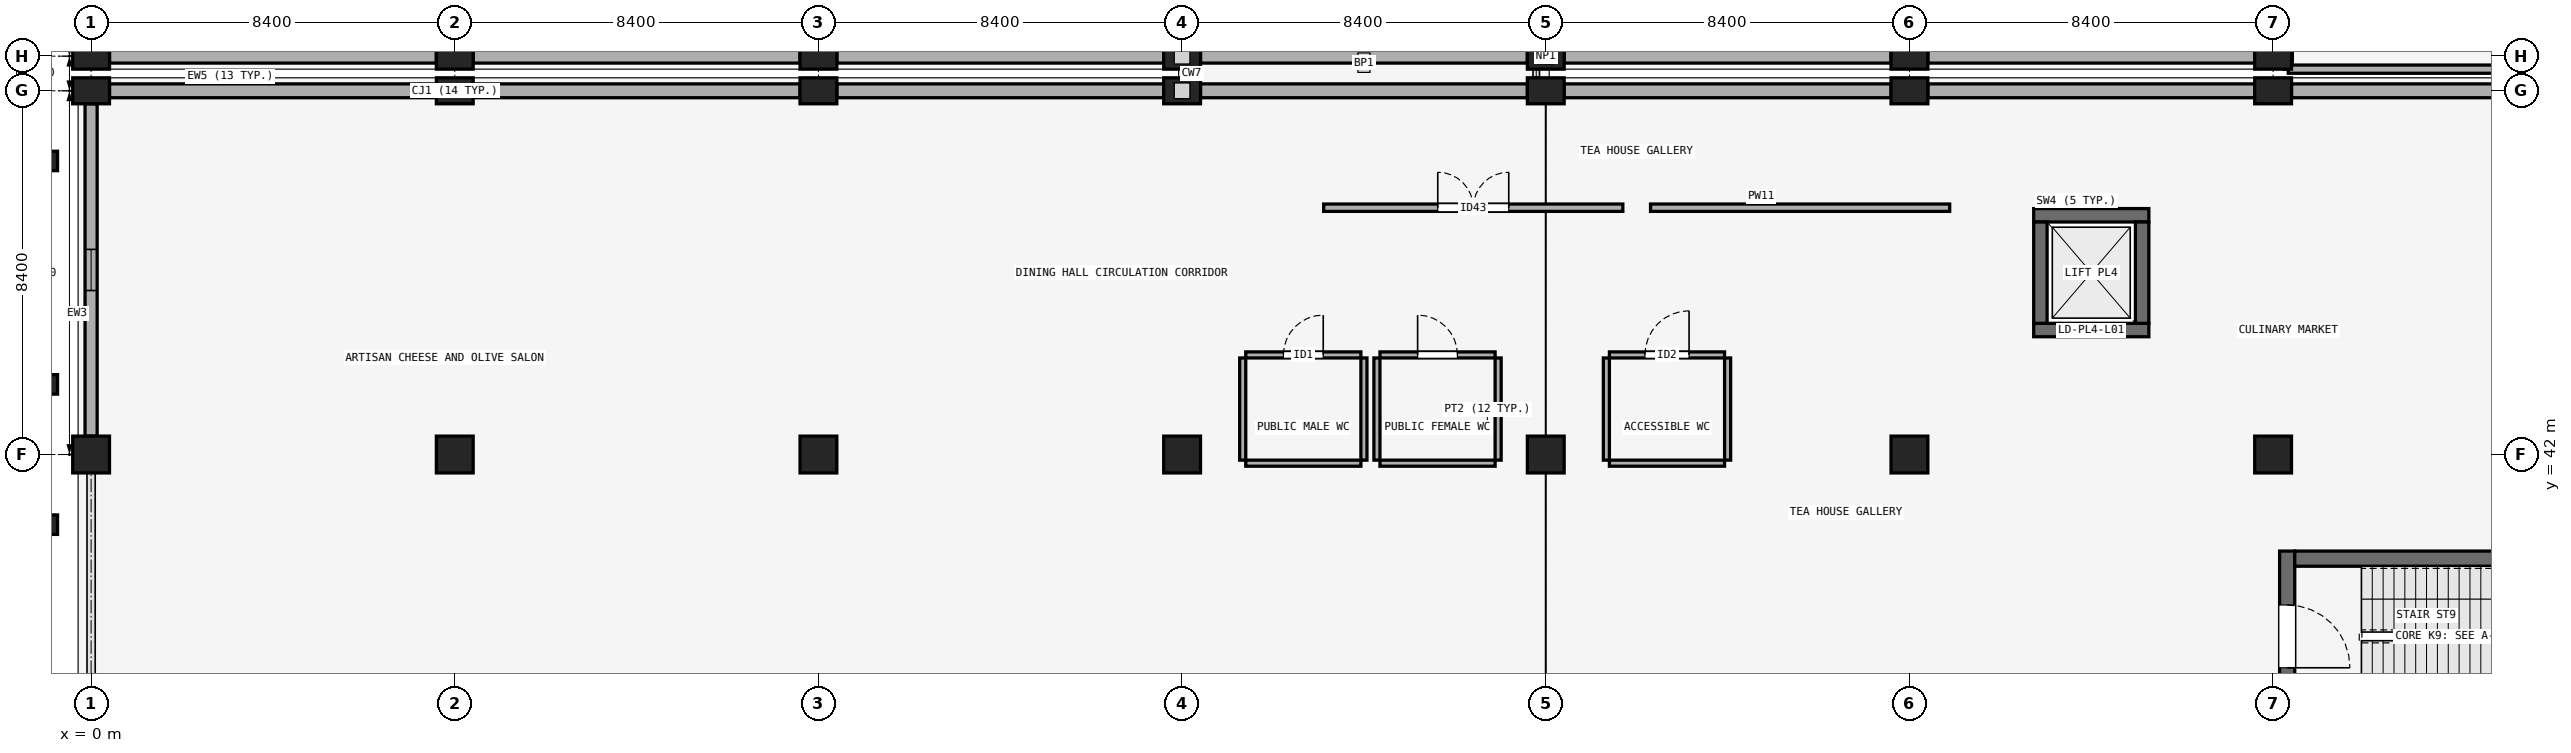
"""IFC4 building model, lengths in metres.
Left out: names, types, materials, properties, quantities, classifications, styles, units other than length and angle.
Written with IfcOpenShell. Run it as: python <this file> out.ifc"""

import sys

from ifc_helpers import new_model, si_unit, direction, frame, frame_2d, origin, origin_2d, place, context, subcontext, project, spatial, rectangle, extrude, element, fill, save


model = new_model("IFC4")
c1 = context("Model", 3, precision=1e-05, world=origin(), true_north=direction((0.0, 1.0)))
c2 = subcontext(c1, "Body", "Model", "MODEL_VIEW")
j1 = project(units=[si_unit("LENGTHUNIT", "METRE"), si_unit("PLANEANGLEUNIT", "RADIAN")], contexts=[c1])
p1 = place(None, origin())
s1 = spatial("IfcSite", under=j1, at=p1, CompositionType="ELEMENT")
p2 = place(p1, origin())
s2 = spatial("IfcBuilding", under=s1, at=p2, CompositionType="ELEMENT")
p3 = place(p2, frame((0.0, 0.0, 5.4)))
s3 = spatial("IfcBuildingStorey", under=s2, at=p3, CompositionType="ELEMENT", Elevation=5.4)
for number, where, z_axis, x_axis in (
    (1, (0.0, 51.2, 0.0), (0.0, 0.0, 1.0), (0.0, 1.0, 0.0)),
    (2, (8.4, 51.2, 0.0), (0.0, 0.0, 1.0), (0.0, 1.0, 0.0)),
    (3, (16.8, 51.2, 0.0), (0.0, 0.0, 1.0), (0.0, 1.0, 0.0)),
    (4, (25.2, 51.2, 0.0), (0.0, 0.0, 1.0), (0.0, 1.0, 0.0)),
    (5, (33.6, 51.2, 0.0), (0.0, 0.0, 1.0), (0.0, 1.0, 0.0)),
    (6, (42.0, 51.2, 0.0), (0.0, 0.0, 1.0), (0.0, 1.0, 0.0)),
    (7, (50.4, 51.2, 0.0), (0.0, 0.0, 1.0), (0.0, 1.0, 0.0)),
):
    element("IfcColumn", number, at=place(p3, frame(where, z_axis=z_axis, x_axis=x_axis)), inside=s3, PredefinedType="COLUMN", context=c2, shape_type="SweptSolid", body=[
        extrude(rectangle(XDim=0.6, YDim=0.85, at=origin_2d()), origin(), (0.0, 0.0, 1.0), 4.5),
    ])
for number, where, z_axis, x_axis in (
    (8, (0.0, 42.0, 0.0), (0.0, 0.0, 1.0), (1.0, 0.0, 0.0)),
    (9, (8.4, 42.0, 0.0), (0.0, 0.0, 1.0), (1.0, 0.0, 0.0)),
    (10, (16.8, 42.0, 0.0), (0.0, 0.0, 1.0), (1.0, 0.0, 0.0)),
    (11, (25.2, 42.0, 0.0), (0.0, 0.0, 1.0), (1.0, 0.0, 0.0)),
    (12, (33.6, 42.0, 0.0), (0.0, 0.0, 1.0), (1.0, 0.0, 0.0)),
    (13, (42.0, 42.0, 0.0), (0.0, 0.0, 1.0), (1.0, 0.0, 0.0)),
    (14, (50.4, 42.0, 0.0), (0.0, 0.0, 1.0), (1.0, 0.0, 0.0)),
):
    element("IfcColumn", number, at=place(p3, frame(where, z_axis=z_axis, x_axis=x_axis)), inside=s3, PredefinedType="COLUMN", context=c2, shape_type="SweptSolid", body=[
        extrude(rectangle(XDim=0.85, YDim=0.85, at=origin_2d()), origin(), (0.0, 0.0, 1.0), 4.5),
    ])
for number, where, z_axis, x_axis in (
    (15, (0.0, 50.4, 0.0), (0.0, 0.0, 1.0), (0.0, 1.0, 0.0)),
    (16, (8.4, 50.4, 0.0), (0.0, 0.0, 1.0), (0.0, 1.0, 0.0)),
    (17, (16.8, 50.4, 0.0), (0.0, 0.0, 1.0), (0.0, 1.0, 0.0)),
    (18, (25.2, 50.4, 0.0), (0.0, 0.0, 1.0), (0.0, 1.0, 0.0)),
    (19, (33.6, 50.4, 0.0), (0.0, 0.0, 1.0), (0.0, 1.0, 0.0)),
    (20, (42.0, 50.4, 0.0), (0.0, 0.0, 1.0), (0.0, 1.0, 0.0)),
    (21, (50.4, 50.4, 0.0), (0.0, 0.0, 1.0), (0.0, 1.0, 0.0)),
):
    element("IfcColumn", number, at=place(p3, frame(where, z_axis=z_axis, x_axis=x_axis)), inside=s3, PredefinedType="COLUMN", context=c2, shape_type="SweptSolid", body=[
        extrude(rectangle(XDim=0.6, YDim=0.85, at=origin_2d()), origin(), (0.0, 0.0, 1.0), 4.5),
    ])
for number, where, z_axis, x_axis in (
    (22, (-1.05, 40.38, 0.0), (0.0, 0.0, 1.0), (0.0, 1.0, 0.0)),
    (23, (-1.05, 43.62, 0.0), (0.0, 0.0, 1.0), (0.0, 1.0, 0.0)),
    (24, (-1.05, 48.78, 0.0), (0.0, 0.0, 1.0), (0.0, 1.0, 0.0)),
):
    element("IfcColumn", number, at=place(p3, frame(where, z_axis=z_axis, x_axis=x_axis)), inside=s3, PredefinedType="PILASTER", context=c2, shape_type="SweptSolid", body=[
        extrude(rectangle(XDim=0.45, YDim=0.55, at=origin_2d()), origin(), (0.0, 0.0, 1.0), 4.5),
    ])
for number, where, z_axis, x_axis in (
    (25, (0.425, 51.2, 0.0), (0.0, 0.0, 1.0), (1.0, 0.0, 0.0)),
    (26, (8.825, 51.2, 0.0), (0.0, 0.0, 1.0), (1.0, 0.0, 0.0)),
):
    element("IfcWall", number, at=place(p3, frame(where, z_axis=z_axis, x_axis=x_axis)), inside=s3, PredefinedType="SOLIDWALL", context=c2, shape_type="SweptSolid", body=[
        extrude(rectangle(XDim=7.55, YDim=0.32, at=frame_2d((3.775, 0.0))), origin(), (0.0, 0.0, 1.0), 3.45),
    ])
p4 = place(p3, frame((17.225, 51.2, 0.0), z_axis=(0.0, 0.0, 1.0), x_axis=(1.0, 0.0, 0.0)))
e27 = element("IfcWall", 27, at=p4, inside=s3, PredefinedType="SOLIDWALL", context=c2, shape_type="SweptSolid", body=[
    extrude(rectangle(XDim=7.55, YDim=0.32, at=frame_2d((3.775, 0.0))), origin(), (0.0, 0.0, 1.0), 3.45),
])
for number, where, z_axis, x_axis in (
    (28, (25.625, 51.2, 0.0), (0.0, 0.0, 1.0), (1.0, 0.0, 0.0)),
    (29, (34.025, 51.2, 0.0), (0.0, 0.0, 1.0), (1.0, 0.0, 0.0)),
    (30, (42.425, 51.2, 0.0), (0.0, 0.0, 1.0), (1.0, 0.0, 0.0)),
):
    element("IfcWall", number, at=place(p3, frame(where, z_axis=z_axis, x_axis=x_axis)), inside=s3, PredefinedType="SOLIDWALL", context=c2, shape_type="SweptSolid", body=[
        extrude(rectangle(XDim=7.55, YDim=0.32, at=frame_2d((3.775, 0.0))), origin(), (0.0, 0.0, 1.0), 3.45),
    ])
for number, where, z_axis, x_axis in (
    (31, (0.425, 50.4, 0.0), (0.0, 0.0, 1.0), (1.0, 0.0, 0.0)),
    (32, (8.825, 50.4, 0.0), (0.0, 0.0, 1.0), (1.0, 0.0, 0.0)),
):
    element("IfcWall", number, at=place(p3, frame(where, z_axis=z_axis, x_axis=x_axis)), inside=s3, PredefinedType="SOLIDWALL", context=c2, shape_type="SweptSolid", body=[
        extrude(rectangle(XDim=7.55, YDim=0.32, at=frame_2d((3.775, 0.0))), origin(), (0.0, 0.0, 1.0), 3.43),
    ])
p5 = place(p3, frame((17.225, 50.4, 0.0), z_axis=(0.0, 0.0, 1.0), x_axis=(1.0, 0.0, 0.0)))
e33 = element("IfcWall", 33, at=p5, inside=s3, PredefinedType="SOLIDWALL", context=c2, shape_type="SweptSolid", body=[
    extrude(rectangle(XDim=7.55, YDim=0.32, at=frame_2d((3.775, 0.0))), origin(), (0.0, 0.0, 1.0), 3.43),
])
for number, where, z_axis, x_axis in (
    (34, (25.625, 50.4, 0.0), (0.0, 0.0, 1.0), (1.0, 0.0, 0.0)),
    (35, (34.025, 50.4, 0.0), (0.0, 0.0, 1.0), (1.0, 0.0, 0.0)),
    (36, (42.425, 50.4, 0.0), (0.0, 0.0, 1.0), (1.0, 0.0, 0.0)),
    (37, (50.825, 50.4, 0.0), (0.0, 0.0, 1.0), (1.0, 0.0, 0.0)),
):
    element("IfcWall", number, at=place(p3, frame(where, z_axis=z_axis, x_axis=x_axis)), inside=s3, PredefinedType="SOLIDWALL", context=c2, shape_type="SweptSolid", body=[
        extrude(rectangle(XDim=7.55, YDim=0.32, at=frame_2d((3.775, 0.0))), origin(), (0.0, 0.0, 1.0), 3.43),
    ])
p6 = place(p3, frame((0.0, 42.425, 0.0), z_axis=(0.0, 0.0, 1.0), x_axis=(0.0, 1.0, 0.0)))
e38 = element("IfcWall", 38, at=p6, inside=s3, PredefinedType="SOLIDWALL", context=c2, shape_type="SweptSolid", body=[
    extrude(rectangle(XDim=7.675, YDim=0.28, at=frame_2d((3.837, 0.0))), origin(), (0.0, 0.0, 1.0), 3.43),
])
p7 = place(p6, frame((3.363, 0.0, 0.95)))
e39 = element("IfcOpeningElement", 39, at=p7, cuts=e38, PredefinedType="OPENING", context=c2, shape_type="SweptSolid", body=[
    extrude(rectangle(XDim=0.95, YDim=1.6, at=frame_2d((0.475, 0.8))), frame((0.0, 0.15, 0.0), z_axis=(0.0, -1.0, 0.0), x_axis=(1.0, 0.0, 0.0)), (0.0, 0.0, 1.0), 0.3),
])
for number, where, z_axis, x_axis in (
    (40, (50.75, 59.25, 0.0), (0.0, 0.0, 1.0), (0.0, -1.0, 0.0)),
    (41, (50.75, 50.9, 0.0), (0.0, 0.0, 1.0), (1.0, 0.0, 0.0)),
):
    element("IfcWall", number, at=place(p3, frame(where, z_axis=z_axis, x_axis=x_axis)), inside=s3, PredefinedType="PARAPET", context=c2, shape_type="SweptSolid", body=[
        extrude(rectangle(XDim=8.35, YDim=0.19, at=frame_2d((4.175, 0.0))), origin(), (0.0, 0.0, 1.0), 0.95),
    ])
p8 = place(p3, frame((50.725, 39.77, 0.0), z_axis=(0.0, 0.0, 1.0), x_axis=(0.0, -1.0, 0.0)))
e42 = element("IfcWall", 42, at=p8, inside=s3, PredefinedType="SHEAR", context=c2, shape_type="SweptSolid", body=[
    extrude(rectangle(XDim=3.94, YDim=0.35, at=frame_2d((1.97, 0.0))), origin(), (0.0, 0.0, 1.0), 4.18),
])
p9 = place(p8, frame((1.245, 0.0, 0.0)))
e43 = element("IfcOpeningElement", 43, at=p9, cuts=e42, PredefinedType="OPENING", context=c2, shape_type="SweptSolid", body=[
    extrude(rectangle(XDim=1.45, YDim=2.2, at=frame_2d((0.725, 1.1))), frame((0.0, 0.185, 0.0), z_axis=(0.0, -1.0, 0.0), x_axis=(1.0, 0.0, 0.0)), (0.0, 0.0, 1.0), 0.37),
])
p10 = place(p3, frame((50.9, 39.595, 0.0), z_axis=(0.0, 0.0, 1.0), x_axis=(1.0, 0.0, 0.0)))
e44 = element("IfcWall", 44, at=p10, inside=s3, PredefinedType="SHEAR", context=c2, shape_type="SweptSolid", body=[
    extrude(rectangle(XDim=7.4, YDim=0.35, at=frame_2d((3.7, 0.0))), origin(), (0.0, 0.0, 1.0), 4.18),
])
p11 = place(p3, frame((44.87, 44.875, 0.0), z_axis=(0.0, 0.0, 1.0), x_axis=(1.0, 0.0, 0.0)))
e45 = element("IfcWall", 45, at=p11, inside=s3, PredefinedType="SHEAR", context=c2, shape_type="SweptSolid", body=[
    extrude(rectangle(XDim=2.66, YDim=0.31, at=frame_2d((1.33, 0.0))), origin(), (0.0, 0.0, 1.0), 4.2),
])
p12 = place(p11, frame((0.78, 0.0, 0.0)))
e46 = element("IfcOpeningElement", 46, at=p12, cuts=e45, PredefinedType="OPENING", context=c2, shape_type="SweptSolid", body=[
    extrude(rectangle(XDim=1.1, YDim=2.2, at=frame_2d((0.55, 1.1))), frame((0.0, 0.165, 0.0), z_axis=(0.0, -1.0, 0.0), x_axis=(1.0, 0.0, 0.0)), (0.0, 0.0, 1.0), 0.33),
])
p13 = place(p3, frame((44.87, 47.525, 0.0), z_axis=(0.0, 0.0, 1.0), x_axis=(1.0, 0.0, 0.0)))
e47 = element("IfcWall", 47, at=p13, inside=s3, PredefinedType="SHEAR", context=c2, shape_type="SweptSolid", body=[
    extrude(rectangle(XDim=2.66, YDim=0.31, at=frame_2d((1.33, 0.0))), origin(), (0.0, 0.0, 1.0), 4.2),
])
for number, where, z_axis, x_axis in (
    (48, (45.025, 45.03, 0.0), (0.0, 0.0, 1.0), (0.0, 1.0, 0.0)),
    (49, (47.375, 45.03, 0.0), (0.0, 0.0, 1.0), (0.0, 1.0, 0.0)),
):
    element("IfcWall", number, at=place(p3, frame(where, z_axis=z_axis, x_axis=x_axis)), inside=s3, PredefinedType="SHEAR", context=c2, shape_type="SweptSolid", body=[
        extrude(rectangle(XDim=2.34, YDim=0.31, at=frame_2d((1.17, 0.0))), origin(), (0.0, 0.0, 1.0), 4.2),
    ])
p14 = place(p3, frame((26.67, 44.3, 0.0), z_axis=(0.0, 0.0, 1.0), x_axis=(1.0, 0.0, 0.0)))
e50 = element("IfcWall", 50, at=p14, inside=s3, PredefinedType="PARTITIONING", context=c2, shape_type="SweptSolid", body=[
    extrude(rectangle(XDim=2.66, YDim=0.14, at=frame_2d((1.33, 0.0))), origin(), (0.0, 0.0, 1.0), 4.2),
])
p15 = place(p14, frame((0.87, 0.0, 0.0)))
e51 = element("IfcOpeningElement", 51, at=p15, cuts=e50, PredefinedType="OPENING", context=c2, shape_type="SweptSolid", body=[
    extrude(rectangle(XDim=0.92, YDim=2.12, at=frame_2d((0.46, 1.06))), frame((0.0, 0.08, 0.0), z_axis=(0.0, -1.0, 0.0), x_axis=(1.0, 0.0, 0.0)), (0.0, 0.0, 1.0), 0.16),
])
p16 = place(p3, frame((26.67, 41.8, 0.0), z_axis=(0.0, 0.0, 1.0), x_axis=(1.0, 0.0, 0.0)))
e52 = element("IfcWall", 52, at=p16, inside=s3, PredefinedType="PARTITIONING", context=c2, shape_type="SweptSolid", body=[
    extrude(rectangle(XDim=2.66, YDim=0.14, at=frame_2d((1.33, 0.0))), origin(), (0.0, 0.0, 1.0), 3.48),
])
for number, where, z_axis, x_axis in (
    (53, (26.6, 41.87, 0.0), (0.0, 0.0, 1.0), (0.0, 1.0, 0.0)),
    (54, (29.4, 41.87, 0.0), (0.0, 0.0, 1.0), (0.0, 1.0, 0.0)),
):
    element("IfcWall", number, at=place(p3, frame(where, z_axis=z_axis, x_axis=x_axis)), inside=s3, PredefinedType="PARTITIONING", context=c2, shape_type="SweptSolid", body=[
        extrude(rectangle(XDim=2.36, YDim=0.14, at=frame_2d((1.18, 0.0))), origin(), (0.0, 0.0, 1.0), 3.48),
    ])
p17 = place(p3, frame((29.77, 44.3, 0.0), z_axis=(0.0, 0.0, 1.0), x_axis=(1.0, 0.0, 0.0)))
e55 = element("IfcWall", 55, at=p17, inside=s3, PredefinedType="PARTITIONING", context=c2, shape_type="SweptSolid", body=[
    extrude(rectangle(XDim=2.66, YDim=0.14, at=frame_2d((1.33, 0.0))), origin(), (0.0, 0.0, 1.0), 4.2),
])
p18 = place(p17, frame((0.87, 0.0, 0.0)))
e56 = element("IfcOpeningElement", 56, at=p18, cuts=e55, PredefinedType="OPENING", context=c2, shape_type="SweptSolid", body=[
    extrude(rectangle(XDim=0.92, YDim=2.12, at=frame_2d((0.46, 1.06))), frame((0.0, 0.08, 0.0), z_axis=(0.0, -1.0, 0.0), x_axis=(1.0, 0.0, 0.0)), (0.0, 0.0, 1.0), 0.16),
])
p19 = place(p3, frame((29.77, 41.8, 0.0), z_axis=(0.0, 0.0, 1.0), x_axis=(1.0, 0.0, 0.0)))
e57 = element("IfcWall", 57, at=p19, inside=s3, PredefinedType="PARTITIONING", context=c2, shape_type="SweptSolid", body=[
    extrude(rectangle(XDim=2.66, YDim=0.14, at=frame_2d((1.33, 0.0))), origin(), (0.0, 0.0, 1.0), 3.48),
])
for number, where, z_axis, x_axis in (
    (58, (29.7, 41.87, 0.0), (0.0, 0.0, 1.0), (0.0, 1.0, 0.0)),
    (59, (32.5, 41.87, 0.0), (0.0, 0.0, 1.0), (0.0, 1.0, 0.0)),
):
    element("IfcWall", number, at=place(p3, frame(where, z_axis=z_axis, x_axis=x_axis)), inside=s3, PredefinedType="PARTITIONING", context=c2, shape_type="SweptSolid", body=[
        extrude(rectangle(XDim=2.36, YDim=0.14, at=frame_2d((1.18, 0.0))), origin(), (0.0, 0.0, 1.0), 3.48),
    ])
p20 = place(p3, frame((35.07, 44.3, 0.0), z_axis=(0.0, 0.0, 1.0), x_axis=(1.0, 0.0, 0.0)))
e60 = element("IfcWall", 60, at=p20, inside=s3, PredefinedType="PARTITIONING", context=c2, shape_type="SweptSolid", body=[
    extrude(rectangle(XDim=2.66, YDim=0.14, at=frame_2d((1.33, 0.0))), origin(), (0.0, 0.0, 1.0), 4.2),
])
p21 = place(p20, frame((0.82, 0.0, 0.0)))
e61 = element("IfcOpeningElement", 61, at=p21, cuts=e60, PredefinedType="OPENING", context=c2, shape_type="SweptSolid", body=[
    extrude(rectangle(XDim=1.02, YDim=2.15, at=frame_2d((0.51, 1.075))), frame((0.0, 0.08, 0.0), z_axis=(0.0, -1.0, 0.0), x_axis=(1.0, 0.0, 0.0)), (0.0, 0.0, 1.0), 0.16),
])
p22 = place(p3, frame((35.07, 41.8, 0.0), z_axis=(0.0, 0.0, 1.0), x_axis=(1.0, 0.0, 0.0)))
e62 = element("IfcWall", 62, at=p22, inside=s3, PredefinedType="PARTITIONING", context=c2, shape_type="SweptSolid", body=[
    extrude(rectangle(XDim=2.66, YDim=0.14, at=frame_2d((1.33, 0.0))), origin(), (0.0, 0.0, 1.0), 3.48),
])
for number, where, z_axis, x_axis in (
    (63, (35.0, 41.87, 0.0), (0.0, 0.0, 1.0), (0.0, 1.0, 0.0)),
    (64, (37.8, 41.87, 0.0), (0.0, 0.0, 1.0), (0.0, 1.0, 0.0)),
):
    element("IfcWall", number, at=place(p3, frame(where, z_axis=z_axis, x_axis=x_axis)), inside=s3, PredefinedType="PARTITIONING", context=c2, shape_type="SweptSolid", body=[
        extrude(rectangle(XDim=2.36, YDim=0.14, at=frame_2d((1.18, 0.0))), origin(), (0.0, 0.0, 1.0), 3.48),
    ])
p23 = place(p3, frame((28.47, 47.7, 0.0), z_axis=(0.0, 0.0, 1.0), x_axis=(1.0, 0.0, 0.0)))
e65 = element("IfcWall", 65, at=p23, inside=s3, PredefinedType="PARTITIONING", context=c2, shape_type="SweptSolid", body=[
    extrude(rectangle(XDim=6.91, YDim=0.17, at=frame_2d((3.455, 0.0))), origin(), (0.0, 0.0, 1.0), 3.43),
])
p24 = place(p23, frame((2.635, 0.0, 0.0)))
e66 = element("IfcOpeningElement", 66, at=p24, cuts=e65, PredefinedType="OPENING", context=c2, shape_type="SweptSolid", body=[
    extrude(rectangle(XDim=1.64, YDim=2.1, at=frame_2d((0.82, 1.05))), frame((0.0, 0.095, 0.0), z_axis=(0.0, -1.0, 0.0), x_axis=(1.0, 0.0, 0.0)), (0.0, 0.0, 1.0), 0.19),
])
p25 = place(p3, frame((36.02, 47.7, 0.0), z_axis=(0.0, 0.0, 1.0), x_axis=(1.0, 0.0, 0.0)))
e67 = element("IfcWall", 67, at=p25, inside=s3, PredefinedType="PARTITIONING", context=c2, shape_type="SweptSolid", body=[
    extrude(rectangle(XDim=6.91, YDim=0.17, at=frame_2d((3.455, 0.0))), origin(), (0.0, 0.0, 1.0), 3.43),
])
p26 = place(p7, origin())
e68 = element("IfcWindow", 68, at=p26, inside=s3, PartitioningType="SINGLE_PANEL", PredefinedType="WINDOW", context=c2, shape_type="SweptSolid", body=[
    extrude(rectangle(XDim=0.95, YDim=1.6, at=frame_2d((0.475, 0.8))), frame((0.0, 0.03, 0.0), z_axis=(0.0, -1.0, 0.0), x_axis=(1.0, 0.0, 0.0)), (0.0, 0.0, 1.0), 0.06),
])
fill(e39, e68)
p27 = place(p9, origin())
e69 = element("IfcDoor", 69, at=p27, inside=s3, OperationType="SINGLE_SWING_RIGHT", PredefinedType="DOOR", context=c2, shape_type="SweptSolid", body=[
    extrude(rectangle(XDim=1.45, YDim=2.2, at=frame_2d((0.725, 1.1))), frame((0.0, 0.025, 0.0), z_axis=(0.0, -1.0, 0.0), x_axis=(1.0, 0.0, 0.0)), (0.0, 0.0, 1.0), 0.05),
])
fill(e43, e69)
p28 = place(p12, origin())
e70 = element("IfcDoor", 70, at=p28, inside=s3, OperationType="SLIDING_TO_LEFT", PredefinedType="DOOR", context=c2, shape_type="SweptSolid", body=[
    extrude(rectangle(XDim=1.1, YDim=2.2, at=frame_2d((0.55, 1.1))), frame((0.0, 0.025, 0.0), z_axis=(0.0, -1.0, 0.0), x_axis=(1.0, 0.0, 0.0)), (0.0, 0.0, 1.0), 0.05),
])
fill(e46, e70)
p29 = place(p15, origin())
e71 = element("IfcDoor", 71, at=p29, inside=s3, OperationType="SINGLE_SWING_RIGHT", PredefinedType="DOOR", context=c2, shape_type="SweptSolid", body=[
    extrude(rectangle(XDim=0.92, YDim=2.12, at=frame_2d((0.46, 1.06))), frame((0.0, 0.025, 0.0), z_axis=(0.0, -1.0, 0.0), x_axis=(1.0, 0.0, 0.0)), (0.0, 0.0, 1.0), 0.05),
])
fill(e51, e71)
p30 = place(p18, origin())
e72 = element("IfcDoor", 72, at=p30, inside=s3, OperationType="SINGLE_SWING_LEFT", PredefinedType="DOOR", context=c2, shape_type="SweptSolid", body=[
    extrude(rectangle(XDim=0.92, YDim=2.12, at=frame_2d((0.46, 1.06))), frame((0.0, 0.025, 0.0), z_axis=(0.0, -1.0, 0.0), x_axis=(1.0, 0.0, 0.0)), (0.0, 0.0, 1.0), 0.05),
])
fill(e56, e72)
p31 = place(p21, origin())
e73 = element("IfcDoor", 73, at=p31, inside=s3, OperationType="SINGLE_SWING_RIGHT", PredefinedType="DOOR", context=c2, shape_type="SweptSolid", body=[
    extrude(rectangle(XDim=1.02, YDim=2.15, at=frame_2d((0.51, 1.075))), frame((0.0, 0.025, 0.0), z_axis=(0.0, -1.0, 0.0), x_axis=(1.0, 0.0, 0.0)), (0.0, 0.0, 1.0), 0.05),
])
fill(e61, e73)
p32 = place(p24, origin())
e74 = element("IfcDoor", 74, at=p32, inside=s3, OperationType="DOUBLE_DOOR_SINGLE_SWING", PredefinedType="DOOR", context=c2, shape_type="SweptSolid", body=[
    extrude(rectangle(XDim=1.64, YDim=2.1, at=frame_2d((0.82, 1.05))), frame((0.0, 0.025, 0.0), z_axis=(0.0, -1.0, 0.0), x_axis=(1.0, 0.0, 0.0)), (0.0, 0.0, 1.0), 0.05),
])
fill(e66, e74)
save(model, sys.argv[1])
